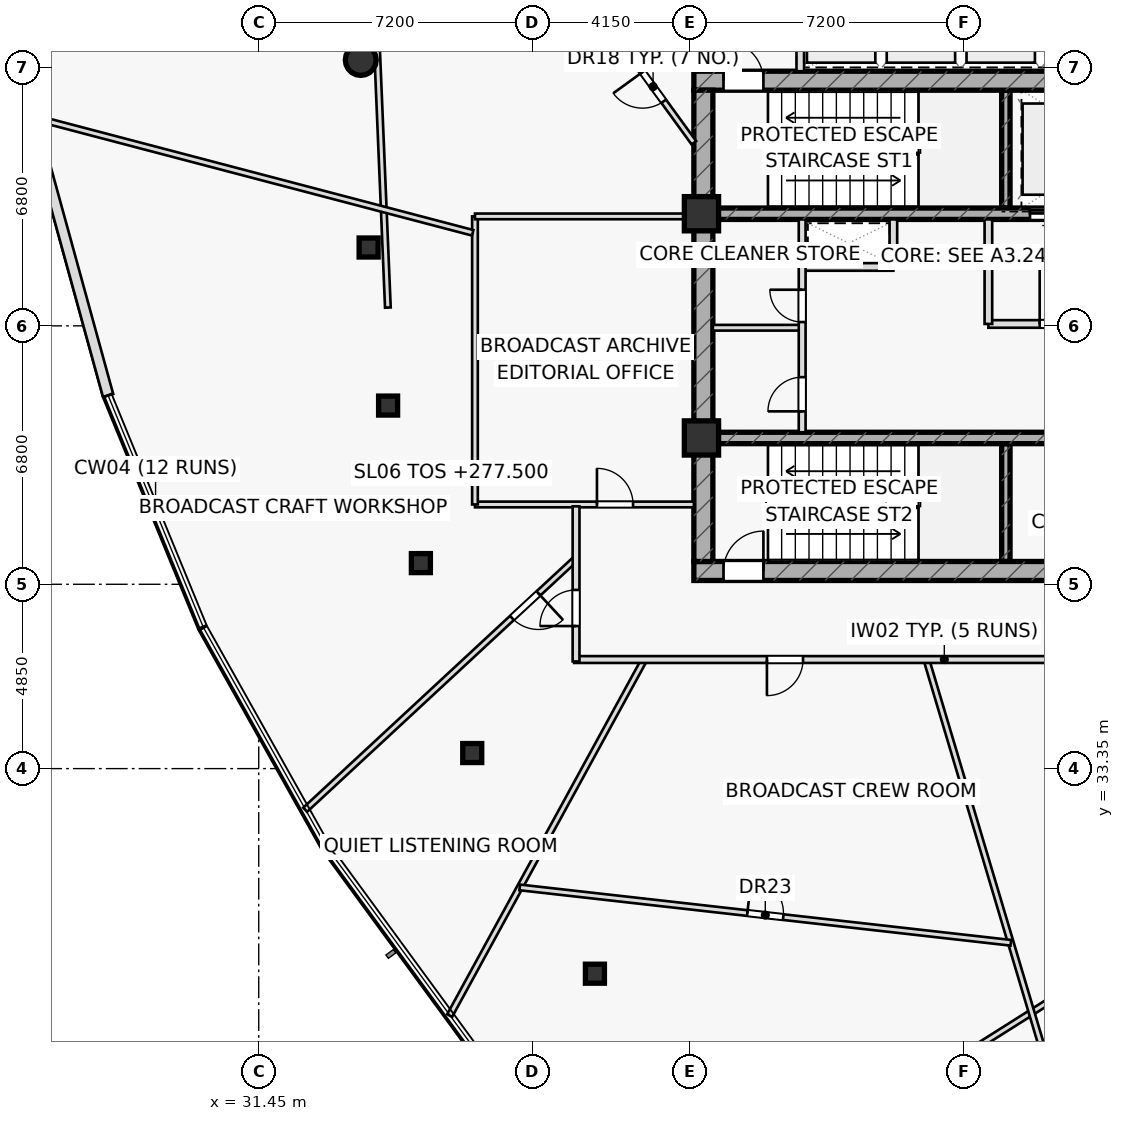
"""IFC4 building model, lengths in metres.
Left out: names, types, materials, properties, quantities, classifications, styles, units other than length and angle.
Written with IfcOpenShell. Run it as: python <this file> out.ifc"""

import sys

from ifc_helpers import new_model, si_unit, direction, frame, frame_2d, origin, origin_2d, place, context, subcontext, project, spatial, rectangle, hollow_rectangle, hollow_circle, extrude, element, fill, save


model = new_model("IFC4")
c1 = context("Model", 3, precision=1e-05, world=origin(), true_north=direction((0.0, 1.0)))
c2 = subcontext(c1, "Body", "Model", "MODEL_VIEW")
j1 = project(units=[si_unit("LENGTHUNIT", "METRE"), si_unit("PLANEANGLEUNIT", "RADIAN")], contexts=[c1])
p1 = place(None, origin())
s1 = spatial("IfcSite", under=j1, at=p1, CompositionType="ELEMENT")
p2 = place(p1, origin())
s2 = spatial("IfcBuilding", under=s1, at=p2, CompositionType="ELEMENT")
p3 = place(p2, frame((0.0, 0.0, 277.5)))
s3 = spatial("IfcBuildingStorey", under=s2, at=p3, CompositionType="ELEMENT", Elevation=277.5)
for number, where, z_axis, x_axis in (
    (1, (51.11, 48.1, 0.0), (0.0, 0.0, 1.0), (0.0, 1.0, 0.0)),
    (2, (51.11, 38.8, 0.0), (0.0, 0.0, 1.0), (0.0, 1.0, 0.0)),
):
    element("IfcWall", number, at=place(p3, frame(where, z_axis=z_axis, x_axis=x_axis)), inside=s3, PredefinedType="SHEAR", context=c2, shape_type="SweptSolid", body=[
        extrude(rectangle(XDim=3.1, YDim=0.22, at=frame_2d((1.55, 0.0))), origin(), (0.0, 0.0, 1.0), 3.7),
    ])
p4 = place(p3, frame((42.9, 51.45, 0.0), z_axis=(0.0, 0.0, 1.0), x_axis=(1.0, 0.0, 0.0)))
e3 = element("IfcWall", 3, at=p4, inside=s3, PredefinedType="SHEAR", context=c2, shape_type="SweptSolid", body=[
    extrude(rectangle(XDim=14.2, YDim=0.5, at=frame_2d((7.1, 0.0))), origin(), (0.0, 0.0, 1.0), 3.7),
])
p5 = place(p4, frame((0.78, 0.0, 0.0)))
e4 = element("IfcOpeningElement", 4, at=p5, cuts=e3, PredefinedType="OPENING", context=c2, shape_type="SweptSolid", body=[
    extrude(rectangle(XDim=1.05, YDim=2.2, at=frame_2d((0.525, 1.1))), frame((0.0, 0.26, 0.0), z_axis=(0.0, -1.0, 0.0), x_axis=(1.0, 0.0, 0.0)), (0.0, 0.0, 1.0), 0.52),
])
p6 = place(p3, frame((42.9, 38.55, 0.0), z_axis=(0.0, 0.0, 1.0), x_axis=(1.0, 0.0, 0.0)))
e5 = element("IfcWall", 5, at=p6, inside=s3, PredefinedType="SHEAR", context=c2, shape_type="SweptSolid", body=[
    extrude(rectangle(XDim=14.2, YDim=0.5, at=frame_2d((7.1, 0.0))), origin(), (0.0, 0.0, 1.0), 3.7),
])
p7 = place(p6, frame((0.78, 0.0, 0.0)))
e6 = element("IfcOpeningElement", 6, at=p7, cuts=e5, PredefinedType="OPENING", context=c2, shape_type="SweptSolid", body=[
    extrude(rectangle(XDim=1.05, YDim=2.2, at=frame_2d((0.525, 1.1))), frame((0.0, 0.26, 0.0), z_axis=(0.0, -1.0, 0.0), x_axis=(1.0, 0.0, 0.0)), (0.0, 0.0, 1.0), 0.52),
])
p8 = place(p3, frame((43.15, 38.8, 0.0), z_axis=(0.0, 0.0, 1.0), x_axis=(0.0, 1.0, 0.0)))
e7 = element("IfcWall", 7, at=p8, inside=s3, PredefinedType="SHEAR", context=c2, shape_type="SweptSolid", body=[
    extrude(rectangle(XDim=12.4, YDim=0.5, at=frame_2d((6.2, 0.0))), origin(), (0.0, 0.0, 1.0), 3.7),
])
p9 = place(p3, frame((43.4, 47.95, 0.0), z_axis=(0.0, 0.0, 1.0), x_axis=(1.0, 0.0, 0.0)))
e8 = element("IfcWall", 8, at=p9, inside=s3, PredefinedType="SHEAR", context=c2, shape_type="SweptSolid", body=[
    extrude(rectangle(XDim=13.2, YDim=0.3, at=frame_2d((6.6, 0.0))), origin(), (0.0, 0.0, 1.0), 3.7),
])
p10 = place(p9, frame((8.345, 0.0, 0.0)))
e9 = element("IfcOpeningElement", 9, at=p10, cuts=e8, PredefinedType="OPENING", context=c2, shape_type="SweptSolid", body=[
    extrude(rectangle(XDim=1.15, YDim=2.2, at=frame_2d((0.575, 1.1))), frame((0.0, 0.16, 0.0), z_axis=(0.0, -1.0, 0.0), x_axis=(1.0, 0.0, 0.0)), (0.0, 0.0, 1.0), 0.32),
])
p11 = place(p9, frame((10.065, 0.0, 0.0)))
e10 = element("IfcOpeningElement", 10, at=p11, cuts=e8, PredefinedType="OPENING", context=c2, shape_type="SweptSolid", body=[
    extrude(rectangle(XDim=1.15, YDim=2.2, at=frame_2d((0.575, 1.1))), frame((0.0, 0.16, 0.0), z_axis=(0.0, -1.0, 0.0), x_axis=(1.0, 0.0, 0.0)), (0.0, 0.0, 1.0), 0.32),
])
p12 = place(p9, frame((11.645, 0.0, 0.0)))
e11 = element("IfcOpeningElement", 11, at=p12, cuts=e8, PredefinedType="OPENING", context=c2, shape_type="SweptSolid", body=[
    extrude(rectangle(XDim=1.15, YDim=2.2, at=frame_2d((0.575, 1.1))), frame((0.0, 0.16, 0.0), z_axis=(0.0, -1.0, 0.0), x_axis=(1.0, 0.0, 0.0)), (0.0, 0.0, 1.0), 0.32),
])
p13 = place(p3, frame((43.4, 42.05, 0.0), z_axis=(0.0, 0.0, 1.0), x_axis=(1.0, 0.0, 0.0)))
e12 = element("IfcWall", 12, at=p13, inside=s3, PredefinedType="SHEAR", context=c2, shape_type="SweptSolid", body=[
    extrude(rectangle(XDim=13.2, YDim=0.3, at=frame_2d((6.6, 0.0))), origin(), (0.0, 0.0, 1.0), 3.7),
])
p14 = place(p13, frame((9.1, 0.0, 0.0)))
e13 = element("IfcOpeningElement", 13, at=p14, cuts=e12, PredefinedType="OPENING", context=c2, shape_type="SweptSolid", body=[
    extrude(rectangle(XDim=1.5, YDim=2.2, at=frame_2d((0.75, 1.1))), frame((0.0, 0.16, 0.0), z_axis=(0.0, -1.0, 0.0), x_axis=(1.0, 0.0, 0.0)), (0.0, 0.0, 1.0), 0.32),
])
for number, where, z_axis, x_axis in (
    (14, (43.1, 47.95, 0.0), (0.0, 0.0, 1.0), (1.0, 0.0, 0.0)),
    (15, (43.1, 42.05, 0.0), (0.0, 0.0, 1.0), (1.0, 0.0, 0.0)),
):
    element("IfcColumn", number, at=place(p3, frame(where, z_axis=z_axis, x_axis=x_axis)), inside=s3, PredefinedType="COLUMN", context=c2, shape_type="SweptSolid", body=[
        extrude(rectangle(XDim=0.9, YDim=0.9, at=origin_2d()), origin(), (0.0, 0.0, 1.0), 3.7),
    ])
p15 = place(p3, frame((34.135, 51.996, 0.0), z_axis=(0.0, 0.0, 1.0), x_axis=(1.0, 0.0, 0.0)))
e16 = element("IfcColumn", 16, at=p15, inside=s3, PredefinedType="COLUMN", context=c2, shape_type="SweptSolid", body=[
    extrude(hollow_circle(Radius=0.406, WallThickness=0.036, at=origin_2d()), origin(), (0.0, 0.0, 1.0), 3.7),
])
for number, where, z_axis, x_axis in (
    (17, (34.342, 47.061, 0.0), (0.0, 0.0, 1.0), (1.0, 0.0, 0.0)),
    (18, (34.854, 42.902, 0.0), (0.0, 0.0, 1.0), (1.0, 0.0, 0.0)),
    (19, (35.717, 38.757, 0.0), (0.0, 0.0, 1.0), (1.0, 0.0, 0.0)),
    (20, (37.068, 33.76, 0.0), (0.0, 0.0, 1.0), (1.0, 0.0, 0.0)),
    (21, (40.296, 27.954, 0.0), (0.0, 0.0, 1.0), (1.0, 0.0, 0.0)),
):
    element("IfcColumn", number, at=place(p3, frame(where, z_axis=z_axis, x_axis=x_axis)), inside=s3, PredefinedType="COLUMN", context=c2, shape_type="SweptSolid", body=[
        extrude(hollow_rectangle(XDim=0.5, YDim=0.5, WallThickness=0.03, at=origin_2d()), origin(), (0.0, 0.0, 1.0), 3.7),
    ])
p16 = place(p3, frame((45.7, 51.7, 0.0), z_axis=(0.0, 0.0, 1.0), x_axis=(0.0, 1.0, 0.0)))
e22 = element("IfcWall", 22, at=p16, inside=s3, PredefinedType="PARTITIONING", context=c2, shape_type="SweptSolid", body=[
    extrude(rectangle(XDim=2.6, YDim=0.2, at=frame_2d((1.3, 0.0))), origin(), (0.0, 0.0, 1.0), 3.7),
])
p17 = place(p3, frame((45.75, 46.55, 0.0), z_axis=(0.0, 0.0, 1.0), x_axis=(1.0, 0.0, 0.0)))
e23 = element("IfcWall", 23, at=p17, inside=s3, PredefinedType="PARTITIONING", context=c2, shape_type="SweptSolid", body=[
    extrude(rectangle(XDim=2.4, YDim=0.2, at=frame_2d((1.2, 0.0))), origin(), (0.0, 0.0, 1.0), 3.7),
])
p18 = place(p3, frame((48.15, 46.55, 0.0), z_axis=(0.0, 0.0, 1.0), x_axis=(0.0, 1.0, 0.0)))
e24 = element("IfcWall", 24, at=p18, inside=s3, PredefinedType="PARTITIONING", context=c2, shape_type="SweptSolid", body=[
    extrude(rectangle(XDim=1.25, YDim=0.2, at=frame_2d((0.625, 0.0))), origin(), (0.0, 0.0, 1.0), 3.7),
])
p19 = place(p3, frame((50.65, 45.05, 0.0), z_axis=(0.0, 0.0, 1.0), x_axis=(1.0, 0.0, 0.0)))
e25 = element("IfcWall", 25, at=p19, inside=s3, PredefinedType="PARTITIONING", context=c2, shape_type="SweptSolid", body=[
    extrude(rectangle(XDim=5.95, YDim=0.2, at=frame_2d((2.975, 0.0))), origin(), (0.0, 0.0, 1.0), 3.7),
])
p20 = place(p19, frame((1.35, 0.0, 0.0)))
e26 = element("IfcOpeningElement", 26, at=p20, cuts=e25, PredefinedType="OPENING", context=c2, shape_type="SweptSolid", body=[
    extrude(rectangle(XDim=1.5, YDim=2.2, at=frame_2d((0.75, 1.1))), frame((0.0, 0.11, 0.0), z_axis=(0.0, -1.0, 0.0), x_axis=(1.0, 0.0, 0.0)), (0.0, 0.0, 1.0), 0.22),
])
p21 = place(p3, frame((50.65, 45.05, 0.0), z_axis=(0.0, 0.0, 1.0), x_axis=(0.0, 1.0, 0.0)))
e27 = element("IfcWall", 27, at=p21, inside=s3, PredefinedType="PARTITIONING", context=c2, shape_type="SweptSolid", body=[
    extrude(rectangle(XDim=2.75, YDim=0.2, at=frame_2d((1.375, 0.0))), origin(), (0.0, 0.0, 1.0), 3.7),
])
p22 = place(p3, frame((43.4, 44.95, 0.0), z_axis=(0.0, 0.0, 1.0), x_axis=(1.0, 0.0, 0.0)))
e28 = element("IfcWall", 28, at=p22, inside=s3, PredefinedType="PARTITIONING", context=c2, shape_type="SweptSolid", body=[
    extrude(rectangle(XDim=2.35, YDim=0.15, at=frame_2d((1.175, 0.0))), origin(), (0.0, 0.0, 1.0), 3.7),
])
p23 = place(p3, frame((45.75, 42.2, 0.0), z_axis=(0.0, 0.0, 1.0), x_axis=(0.0, 1.0, 0.0)))
e29 = element("IfcWall", 29, at=p23, inside=s3, PredefinedType="PARTITIONING", context=c2, shape_type="SweptSolid", body=[
    extrude(rectangle(XDim=5.6, YDim=0.18, at=frame_2d((2.8, 0.0))), origin(), (0.0, 0.0, 1.0), 3.7),
])
p24 = place(p23, frame((0.55, 0.0, 0.0)))
e30 = element("IfcOpeningElement", 30, at=p24, cuts=e29, PredefinedType="OPENING", context=c2, shape_type="SweptSolid", body=[
    extrude(rectangle(XDim=0.9, YDim=2.05, at=frame_2d((0.45, 1.025))), frame((0.0, 0.1, 0.0), z_axis=(0.0, -1.0, 0.0), x_axis=(1.0, 0.0, 0.0)), (0.0, 0.0, 1.0), 0.2),
])
p25 = place(p23, frame((2.9, 0.0, 0.0)))
e31 = element("IfcOpeningElement", 31, at=p25, cuts=e29, PredefinedType="OPENING", context=c2, shape_type="SweptSolid", body=[
    extrude(rectangle(XDim=0.85, YDim=2.05, at=frame_2d((0.425, 1.025))), frame((0.0, 0.1, 0.0), z_axis=(0.0, -1.0, 0.0), x_axis=(1.0, 0.0, 0.0)), (0.0, 0.0, 1.0), 0.2),
])
p26 = place(p3, frame((34.507, 53.613, 0.0), z_axis=(0.0, 0.0, 1.0), x_axis=(0.041875090182, -0.999122853718, 0.0)))
e32 = element("IfcWall", 32, at=p26, inside=s3, PredefinedType="PARTITIONING", context=c2, shape_type="SweptSolid", body=[
    extrude(rectangle(XDim=8.139, YDim=0.15, at=frame_2d((4.069, 0.0))), origin(), (0.0, 0.0, 1.0), 3.235),
])
p27 = place(p3, frame((44.927, 22.605, 0.0), z_axis=(0.0, 0.0, 1.0), x_axis=(0.845624548895, 0.533778158326, 0.0)))
e33 = element("IfcWall", 33, at=p27, inside=s3, PredefinedType="PARTITIONING", context=c2, shape_type="SweptSolid", body=[
    extrude(rectangle(XDim=10.861, YDim=0.15, at=frame_2d((5.431, 0.0))), origin(), (0.0, 0.0, 1.0), 3.175),
])
p28 = place(p3, frame((37.14, 40.3, 0.0), z_axis=(0.0, 0.0, 1.0), x_axis=(1.0, 0.0, 0.0)))
e34 = element("IfcWall", 34, at=p28, inside=s3, PredefinedType="PARTITIONING", context=c2, shape_type="SweptSolid", body=[
    extrude(rectangle(XDim=5.76, YDim=0.15, at=frame_2d((2.88, 0.0))), origin(), (0.0, 0.0, 1.0), 3.175),
])
p29 = place(p28, frame((3.21, 0.0, 0.0)))
e35 = element("IfcOpeningElement", 35, at=p29, cuts=e34, PredefinedType="OPENING", context=c2, shape_type="SweptSolid", body=[
    extrude(rectangle(XDim=0.95, YDim=2.05, at=frame_2d((0.475, 1.025))), frame((0.0, 0.085, 0.0), z_axis=(0.0, -1.0, 0.0), x_axis=(1.0, 0.0, 0.0)), (0.0, 0.0, 1.0), 0.17),
])
p30 = place(p3, frame((37.14, 40.3, 0.0), z_axis=(0.0, 0.0, 1.0), x_axis=(0.0, 1.0, 0.0)))
e36 = element("IfcWall", 36, at=p30, inside=s3, PredefinedType="PARTITIONING", context=c2, shape_type="SweptSolid", body=[
    extrude(rectangle(XDim=7.58, YDim=0.15, at=frame_2d((3.79, 0.0))), origin(), (0.0, 0.0, 1.0), 3.7),
])
p31 = place(p3, frame((37.14, 47.88, 0.0), z_axis=(0.0, 0.0, 1.0), x_axis=(1.0, 0.0, 0.0)))
e37 = element("IfcWall", 37, at=p31, inside=s3, PredefinedType="PARTITIONING", context=c2, shape_type="SweptSolid", body=[
    extrude(rectangle(XDim=5.76, YDim=0.15, at=frame_2d((2.88, 0.0))), origin(), (0.0, 0.0, 1.0), 3.7),
])
p32 = place(p3, frame((42.9, 49.817, 0.0), z_axis=(0.0, 0.0, 1.0), x_axis=(-0.587773939709, 0.809025213327, 0.0)))
e38 = element("IfcWall", 38, at=p32, inside=s3, PredefinedType="PARTITIONING", context=c2, shape_type="SweptSolid", body=[
    extrude(rectangle(XDim=15.513, YDim=0.15, at=frame_2d((7.757, 0.0))), origin(), (0.0, 0.0, 1.0), 3.175),
])
p33 = place(p32, frame((1.35, 0.0, 0.0)))
e39 = element("IfcOpeningElement", 39, at=p33, cuts=e38, PredefinedType="OPENING", context=c2, shape_type="SweptSolid", body=[
    extrude(rectangle(XDim=0.95, YDim=2.05, at=frame_2d((0.475, 1.025))), frame((0.0, 0.085, 0.0), z_axis=(0.0, -1.0, 0.0), x_axis=(1.0, 0.0, 0.0)), (0.0, 0.0, 1.0), 0.17),
])
p34 = place(p3, frame((37.08, 47.448, 0.0), z_axis=(0.0, 0.0, 1.0), x_axis=(-0.967190208987, 0.254053340148, 0.0)))
e40 = element("IfcWall", 40, at=p34, inside=s3, PredefinedType="PARTITIONING", context=c2, shape_type="SweptSolid", body=[
    extrude(rectangle(XDim=11.883, YDim=0.15, at=frame_2d((5.941, 0.0))), origin(), (0.0, 0.0, 1.0), 3.175),
])
p35 = place(p3, frame((39.8, 38.878, 0.0), z_axis=(0.0, 0.0, 1.0), x_axis=(-0.733162754584, -0.680053215044, 0.0)))
e41 = element("IfcWall", 41, at=p35, inside=s3, PredefinedType="PARTITIONING", context=c2, shape_type="SweptSolid", body=[
    extrude(rectangle(XDim=9.722, YDim=0.15, at=frame_2d((4.861, 0.0))), origin(), (0.0, 0.0, 1.0), 3.235),
])
p36 = place(p35, frame((1.35, 0.0, 0.0)))
e42 = element("IfcOpeningElement", 42, at=p36, cuts=e41, PredefinedType="OPENING", context=c2, shape_type="SweptSolid", body=[
    extrude(rectangle(XDim=0.95, YDim=2.05, at=frame_2d((0.475, 1.025))), frame((0.0, 0.085, 0.0), z_axis=(0.0, -1.0, 0.0), x_axis=(1.0, 0.0, 0.0)), (0.0, 0.0, 1.0), 0.17),
])
p37 = place(p3, frame((41.598, 36.22, 0.0), z_axis=(0.0, 0.0, 1.0), x_axis=(-0.479861016029, -0.877344519157, 0.0)))
e43 = element("IfcWall", 43, at=p37, inside=s3, PredefinedType="PARTITIONING", context=c2, shape_type="SweptSolid", body=[
    extrude(rectangle(XDim=10.678, YDim=0.15, at=frame_2d((5.339, 0.0))), origin(), (0.0, 0.0, 1.0), 3.235),
])
p38 = place(p3, frame((49.018, 36.22, 0.0), z_axis=(0.0, 0.0, 1.0), x_axis=(0.285749448788, -0.958304363195, 0.0)))
e44 = element("IfcWall", 44, at=p38, inside=s3, PredefinedType="PARTITIONING", context=c2, shape_type="SweptSolid", body=[
    extrude(rectangle(XDim=12.152, YDim=0.15, at=frame_2d((6.076, 0.0))), origin(), (0.0, 0.0, 1.0), 3.235),
])
p39 = place(p3, frame((38.318, 30.224, 0.0), z_axis=(0.0, 0.0, 1.0), x_axis=(0.993703389401, -0.112042732438, 0.0)))
e45 = element("IfcWall", 45, at=p39, inside=s3, PredefinedType="PARTITIONING", context=c2, shape_type="SweptSolid", body=[
    extrude(rectangle(XDim=13.004, YDim=0.15, at=frame_2d((6.502, 0.0))), origin(), (0.0, 0.0, 1.0), 3.235),
])
p40 = place(p39, frame((6.027, 0.0, 0.0)))
e46 = element("IfcOpeningElement", 46, at=p40, cuts=e45, PredefinedType="OPENING", context=c2, shape_type="SweptSolid", body=[
    extrude(rectangle(XDim=0.95, YDim=2.05, at=frame_2d((0.475, 1.025))), frame((0.0, 0.085, 0.0), z_axis=(0.0, -1.0, 0.0), x_axis=(1.0, 0.0, 0.0)), (0.0, 0.0, 1.0), 0.17),
])
p41 = place(p3, frame((59.23, 36.22, 0.0), z_axis=(0.0, 0.0, 1.0), x_axis=(-1.0, 0.0, 0.0)))
e47 = element("IfcWall", 47, at=p41, inside=s3, PredefinedType="PARTITIONING", context=c2, shape_type="SweptSolid", body=[
    extrude(rectangle(XDim=19.48, YDim=0.18, at=frame_2d((9.74, 0.0))), origin(), (0.0, 0.0, 1.0), 3.175),
])
p42 = place(p41, frame((4.731, 0.0, 0.0)))
e48 = element("IfcOpeningElement", 48, at=p42, cuts=e47, PredefinedType="OPENING", context=c2, shape_type="SweptSolid", body=[
    extrude(rectangle(XDim=0.95, YDim=2.05, at=frame_2d((0.475, 1.025))), frame((0.0, 0.1, 0.0), z_axis=(0.0, -1.0, 0.0), x_axis=(1.0, 0.0, 0.0)), (0.0, 0.0, 1.0), 0.2),
])
p43 = place(p41, frame((13.458, 0.0, 0.0)))
e49 = element("IfcOpeningElement", 49, at=p43, cuts=e47, PredefinedType="OPENING", context=c2, shape_type="SweptSolid", body=[
    extrude(rectangle(XDim=0.95, YDim=2.05, at=frame_2d((0.475, 1.025))), frame((0.0, 0.1, 0.0), z_axis=(0.0, -1.0, 0.0), x_axis=(1.0, 0.0, 0.0)), (0.0, 0.0, 1.0), 0.2),
])
p44 = place(p3, frame((39.8, 36.17, 0.0), z_axis=(0.0, 0.0, 1.0), x_axis=(0.0, 1.0, 0.0)))
e50 = element("IfcWall", 50, at=p44, inside=s3, PredefinedType="PARTITIONING", context=c2, shape_type="SweptSolid", body=[
    extrude(rectangle(XDim=4.08, YDim=0.18, at=frame_2d((2.04, 0.0))), origin(), (0.0, 0.0, 1.0), 3.435),
])
p45 = place(p44, frame((0.931, 0.0, 0.0)))
e51 = element("IfcOpeningElement", 51, at=p45, cuts=e50, PredefinedType="OPENING", context=c2, shape_type="SweptSolid", body=[
    extrude(rectangle(XDim=0.95, YDim=2.05, at=frame_2d((0.475, 1.025))), frame((0.0, 0.1, 0.0), z_axis=(0.0, -1.0, 0.0), x_axis=(1.0, 0.0, 0.0)), (0.0, 0.0, 1.0), 0.2),
])
p46 = place(p3, frame((25.732, 49.549, 0.0), z_axis=(0.0, 0.0, 1.0), x_axis=(0.265108464752, -0.964218596542, 0.0)))
e52 = element("IfcWall", 52, at=p46, inside=s3, PredefinedType="STANDARD", context=c2, shape_type="SweptSolid", body=[
    extrude(rectangle(XDim=6.618, YDim=0.28, at=frame_2d((3.309, 0.0))), origin(), (0.0, 0.0, 1.0), 3.7),
])
p47 = place(p5, origin())
e53 = element("IfcDoor", 53, at=p47, inside=s3, OperationType="SINGLE_SWING_LEFT", PredefinedType="DOOR", context=c2, shape_type="SweptSolid", body=[
    extrude(rectangle(XDim=1.05, YDim=2.2, at=frame_2d((0.525, 1.1))), frame((0.0, 0.025, 0.0), z_axis=(0.0, -1.0, 0.0), x_axis=(1.0, 0.0, 0.0)), (0.0, 0.0, 1.0), 0.05),
])
fill(e4, e53)
p48 = place(p7, origin())
e54 = element("IfcDoor", 54, at=p48, inside=s3, OperationType="SINGLE_SWING_RIGHT", PredefinedType="DOOR", context=c2, shape_type="SweptSolid", body=[
    extrude(rectangle(XDim=1.05, YDim=2.2, at=frame_2d((0.525, 1.1))), frame((0.0, 0.025, 0.0), z_axis=(0.0, -1.0, 0.0), x_axis=(1.0, 0.0, 0.0)), (0.0, 0.0, 1.0), 0.05),
])
fill(e6, e54)
p49 = place(p20, origin())
e55 = element("IfcDoor", 55, at=p49, inside=s3, OperationType="SINGLE_SWING_LEFT", PredefinedType="DOOR", context=c2, shape_type="SweptSolid", body=[
    extrude(rectangle(XDim=1.5, YDim=2.2, at=frame_2d((0.75, 1.1))), frame((0.0, 0.025, 0.0), z_axis=(0.0, -1.0, 0.0), x_axis=(1.0, 0.0, 0.0)), (0.0, 0.0, 1.0), 0.05),
])
fill(e26, e55)
p50 = place(p24, origin())
e56 = element("IfcDoor", 56, at=p50, inside=s3, OperationType="SINGLE_SWING_LEFT", PredefinedType="DOOR", context=c2, shape_type="SweptSolid", body=[
    extrude(rectangle(XDim=0.9, YDim=2.05, at=frame_2d((0.45, 1.025))), frame((0.0, 0.025, 0.0), z_axis=(0.0, -1.0, 0.0), x_axis=(1.0, 0.0, 0.0)), (0.0, 0.0, 1.0), 0.05),
])
fill(e30, e56)
p51 = place(p25, origin())
e57 = element("IfcDoor", 57, at=p51, inside=s3, OperationType="SINGLE_SWING_RIGHT", PredefinedType="DOOR", context=c2, shape_type="SweptSolid", body=[
    extrude(rectangle(XDim=0.85, YDim=2.05, at=frame_2d((0.425, 1.025))), frame((0.0, 0.025, 0.0), z_axis=(0.0, -1.0, 0.0), x_axis=(1.0, 0.0, 0.0)), (0.0, 0.0, 1.0), 0.05),
])
fill(e31, e57)
p52 = place(p29, origin())
e58 = element("IfcDoor", 58, at=p52, inside=s3, OperationType="SINGLE_SWING_LEFT", PredefinedType="DOOR", context=c2, shape_type="SweptSolid", body=[
    extrude(rectangle(XDim=0.95, YDim=2.05, at=frame_2d((0.475, 1.025))), frame((0.0, 0.025, 0.0), z_axis=(0.0, -1.0, 0.0), x_axis=(1.0, 0.0, 0.0)), (0.0, 0.0, 1.0), 0.05),
])
fill(e35, e58)
p53 = place(p33, origin())
e59 = element("IfcDoor", 59, at=p53, inside=s3, OperationType="SINGLE_SWING_RIGHT", PredefinedType="DOOR", context=c2, shape_type="SweptSolid", body=[
    extrude(rectangle(XDim=0.95, YDim=2.05, at=frame_2d((0.475, 1.025))), frame((0.0, 0.025, 0.0), z_axis=(0.0, -1.0, 0.0), x_axis=(1.0, 0.0, 0.0)), (0.0, 0.0, 1.0), 0.05),
])
fill(e39, e59)
p54 = place(p36, origin())
e60 = element("IfcDoor", 60, at=p54, inside=s3, OperationType="SINGLE_SWING_LEFT", PredefinedType="DOOR", context=c2, shape_type="SweptSolid", body=[
    extrude(rectangle(XDim=0.95, YDim=2.05, at=frame_2d((0.475, 1.025))), frame((0.0, 0.025, 0.0), z_axis=(0.0, -1.0, 0.0), x_axis=(1.0, 0.0, 0.0)), (0.0, 0.0, 1.0), 0.05),
])
fill(e42, e60)
p55 = place(p40, origin())
e61 = element("IfcDoor", 61, at=p55, inside=s3, OperationType="SINGLE_SWING_LEFT", PredefinedType="DOOR", context=c2, shape_type="SweptSolid", body=[
    extrude(rectangle(XDim=0.95, YDim=2.05, at=frame_2d((0.475, 1.025))), frame((0.0, 0.025, 0.0), z_axis=(0.0, -1.0, 0.0), x_axis=(1.0, 0.0, 0.0)), (0.0, 0.0, 1.0), 0.05),
])
fill(e46, e61)
p56 = place(p43, origin())
e62 = element("IfcDoor", 62, at=p56, inside=s3, OperationType="SINGLE_SWING_RIGHT", PredefinedType="DOOR", context=c2, shape_type="SweptSolid", body=[
    extrude(rectangle(XDim=0.95, YDim=2.05, at=frame_2d((0.475, 1.025))), frame((0.0, 0.025, 0.0), z_axis=(0.0, -1.0, 0.0), x_axis=(1.0, 0.0, 0.0)), (0.0, 0.0, 1.0), 0.05),
])
fill(e49, e62)
p57 = place(p45, origin())
e63 = element("IfcDoor", 63, at=p57, inside=s3, OperationType="SINGLE_SWING_LEFT", PredefinedType="DOOR", context=c2, shape_type="SweptSolid", body=[
    extrude(rectangle(XDim=0.95, YDim=2.05, at=frame_2d((0.475, 1.025))), frame((0.0, 0.025, 0.0), z_axis=(0.0, -1.0, 0.0), x_axis=(1.0, 0.0, 0.0)), (0.0, 0.0, 1.0), 0.05),
])
fill(e51, e63)
p58 = place(p10, origin())
e64 = element("IfcDoor", 64, at=p58, inside=s3, OperationType="SLIDING_TO_LEFT", PredefinedType="DOOR", context=c2, shape_type="SweptSolid", body=[
    extrude(rectangle(XDim=1.15, YDim=2.2, at=frame_2d((0.575, 1.1))), frame((0.0, 0.025, 0.0), z_axis=(0.0, -1.0, 0.0), x_axis=(1.0, 0.0, 0.0)), (0.0, 0.0, 1.0), 0.05),
])
fill(e9, e64)
save(model, sys.argv[1])
